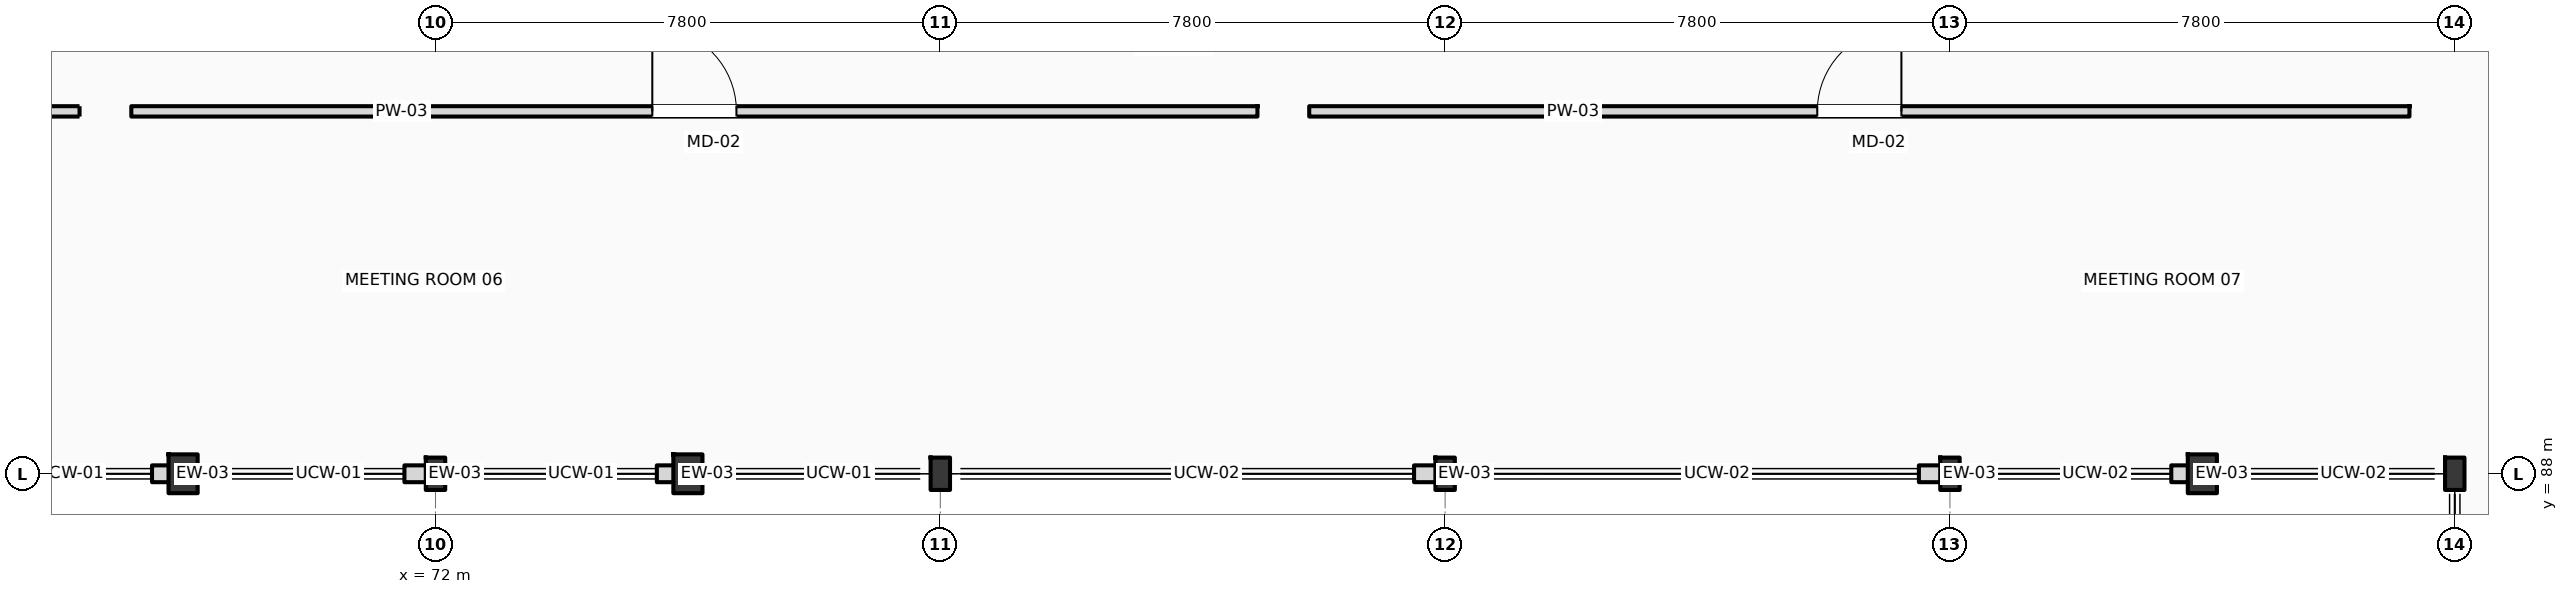
"""IFC4 building model, lengths in metres.
Left out: names, types, materials, properties, quantities, classifications, styles, units other than length and angle.
Written with IfcOpenShell. Run it as: python <this file> out.ifc"""

import sys

from ifc_helpers import new_model, si_unit, direction, frame, frame_2d, origin, origin_2d, place, context, subcontext, project, spatial, rectangle, i_section, extrude, element, fill, save


model = new_model("IFC4")
c1 = context("Model", 3, precision=1e-05, world=origin(), true_north=direction((0.0, 1.0)))
c2 = subcontext(c1, "Body", "Model", "MODEL_VIEW")
j1 = project(units=[si_unit("LENGTHUNIT", "METRE"), si_unit("PLANEANGLEUNIT", "RADIAN")], contexts=[c1])
p1 = place(None, origin())
s1 = spatial("IfcSite", under=j1, at=p1, CompositionType="ELEMENT")
p2 = place(p1, origin())
s2 = spatial("IfcBuilding", under=s1, at=p2, CompositionType="ELEMENT")
p3 = place(p2, frame((0.0, 0.0, 16.2)))
s3 = spatial("IfcBuildingStorey", under=s2, at=p3, CompositionType="ELEMENT", Elevation=16.2)
for number, where, z_axis, x_axis in (
    (1, (72.0, 88.0, 0.0), (0.0, 0.0, 1.0), (1.0, 0.0, 0.0)),
    (2, (79.8, 88.0, 0.0), (0.0, 0.0, 1.0), (1.0, 0.0, 0.0)),
    (3, (87.6, 88.0, 0.0), (0.0, 0.0, 1.0), (1.0, 0.0, 0.0)),
    (4, (95.4, 88.0, 0.0), (0.0, 0.0, 1.0), (1.0, 0.0, 0.0)),
    (5, (103.2, 88.0, 0.0), (0.0, 0.0, 1.0), (1.0, 0.0, 0.0)),
):
    element("IfcColumn", number, at=place(p3, frame(where, z_axis=z_axis, x_axis=x_axis)), inside=s3, PredefinedType="COLUMN", context=c2, shape_type="SweptSolid", body=[
        extrude(i_section(OverallWidth=0.3, OverallDepth=0.5, WebThickness=0.014, FlangeThickness=0.028, FilletRadius=0.027, at=origin_2d()), origin(), (0.0, 0.0, 1.0), 4.2),
    ])
for number, where, z_axis, x_axis in (
    (6, (68.1, 88.0, 0.0), (0.0, 0.0, 1.0), (1.0, 0.0, 0.0)),
    (7, (75.9, 88.0, 0.0), (0.0, 0.0, 1.0), (1.0, 0.0, 0.0)),
    (8, (99.3, 88.0, 0.0), (0.0, 0.0, 1.0), (1.0, 0.0, 0.0)),
):
    element("IfcColumn", number, at=place(p3, frame(where, z_axis=z_axis, x_axis=x_axis)), inside=s3, PredefinedType="PILASTER", context=c2, shape_type="SweptSolid", body=[
        extrude(rectangle(XDim=0.45, YDim=0.6, at=origin_2d()), origin(), (0.0, 0.0, 1.0), 4.2),
    ])
for number, where, z_axis, x_axis in (
    (9, (67.62, 88.0, 0.0), (0.0, 0.0, 1.0), (1.0, 0.0, 0.0)),
    (10, (71.52, 88.0, 0.0), (0.0, 0.0, 1.0), (1.0, 0.0, 0.0)),
    (11, (75.42, 88.0, 0.0), (0.0, 0.0, 1.0), (1.0, 0.0, 0.0)),
    (12, (87.12, 88.0, 0.0), (0.0, 0.0, 1.0), (1.0, 0.0, 0.0)),
    (13, (94.92, 88.0, 0.0), (0.0, 0.0, 1.0), (1.0, 0.0, 0.0)),
    (14, (98.82, 88.0, 0.0), (0.0, 0.0, 1.0), (1.0, 0.0, 0.0)),
):
    element("IfcWall", number, at=place(p3, frame(where, z_axis=z_axis, x_axis=x_axis)), inside=s3, PredefinedType="STANDARD", context=c2, shape_type="SweptSolid", body=[
        extrude(rectangle(XDim=0.96, YDim=0.26, at=frame_2d((0.48, 0.0))), origin(), (0.0, 0.0, 1.0), 3.46),
    ])
p4 = place(p3, frame((49.1, 93.6, 0.0), z_axis=(0.0, 0.0, 1.0), x_axis=(1.0, 0.0, 0.0)))
e15 = element("IfcWall", 15, at=p4, inside=s3, PredefinedType="PARTITIONING", context=c2, shape_type="SweptSolid", body=[
    extrude(rectangle(XDim=17.4, YDim=0.16, at=frame_2d((8.7, 0.0))), origin(), (0.0, 0.0, 1.0), 3.92),
])
p5 = place(p4, frame((8.05, 0.0, 0.0)))
e16 = element("IfcOpeningElement", 16, at=p5, cuts=e15, PredefinedType="OPENING", context=c2, shape_type="SweptSolid", body=[
    extrude(rectangle(XDim=1.3, YDim=2.2, at=frame_2d((0.65, 1.1))), frame((0.0, 0.09, 0.0), z_axis=(0.0, -1.0, 0.0), x_axis=(1.0, 0.0, 0.0)), (0.0, 0.0, 1.0), 0.18),
])
p6 = place(p3, frame((67.3, 93.6, 0.0), z_axis=(0.0, 0.0, 1.0), x_axis=(1.0, 0.0, 0.0)))
e17 = element("IfcWall", 17, at=p6, inside=s3, PredefinedType="PARTITIONING", context=c2, shape_type="SweptSolid", body=[
    extrude(rectangle(XDim=17.4, YDim=0.16, at=frame_2d((8.7, 0.0))), origin(), (0.0, 0.0, 1.0), 3.92),
])
p7 = place(p6, frame((8.05, 0.0, 0.0)))
e18 = element("IfcOpeningElement", 18, at=p7, cuts=e17, PredefinedType="OPENING", context=c2, shape_type="SweptSolid", body=[
    extrude(rectangle(XDim=1.3, YDim=2.2, at=frame_2d((0.65, 1.1))), frame((0.0, 0.09, 0.0), z_axis=(0.0, -1.0, 0.0), x_axis=(1.0, 0.0, 0.0)), (0.0, 0.0, 1.0), 0.18),
])
p8 = place(p3, frame((85.5, 93.6, 0.0), z_axis=(0.0, 0.0, 1.0), x_axis=(1.0, 0.0, 0.0)))
e19 = element("IfcWall", 19, at=p8, inside=s3, PredefinedType="PARTITIONING", context=c2, shape_type="SweptSolid", body=[
    extrude(rectangle(XDim=17.0, YDim=0.16, at=frame_2d((8.5, 0.0))), origin(), (0.0, 0.0, 1.0), 3.92),
])
p9 = place(p8, frame((7.85, 0.0, 0.0)))
e20 = element("IfcOpeningElement", 20, at=p9, cuts=e19, PredefinedType="OPENING", context=c2, shape_type="SweptSolid", body=[
    extrude(rectangle(XDim=1.3, YDim=2.2, at=frame_2d((0.65, 1.1))), frame((0.0, 0.09, 0.0), z_axis=(0.0, -1.0, 0.0), x_axis=(1.0, 0.0, 0.0)), (0.0, 0.0, 1.0), 0.18),
])
p10 = place(p7, origin())
e21 = element("IfcDoor", 21, at=p10, inside=s3, OperationType="SINGLE_SWING_LEFT", PredefinedType="DOOR", context=c2, shape_type="SweptSolid", body=[
    extrude(rectangle(XDim=1.3, YDim=2.2, at=frame_2d((0.65, 1.1))), frame((0.0, 0.025, 0.0), z_axis=(0.0, -1.0, 0.0), x_axis=(1.0, 0.0, 0.0)), (0.0, 0.0, 1.0), 0.05),
])
fill(e18, e21)
p11 = place(p9, origin())
e22 = element("IfcDoor", 22, at=p11, inside=s3, OperationType="SINGLE_SWING_RIGHT", PredefinedType="DOOR", context=c2, shape_type="SweptSolid", body=[
    extrude(rectangle(XDim=1.3, YDim=2.2, at=frame_2d((0.65, 1.1))), frame((0.0, 0.025, 0.0), z_axis=(0.0, -1.0, 0.0), x_axis=(1.0, 0.0, 0.0)), (0.0, 0.0, 1.0), 0.05),
])
fill(e20, e22)
save(model, sys.argv[1])
